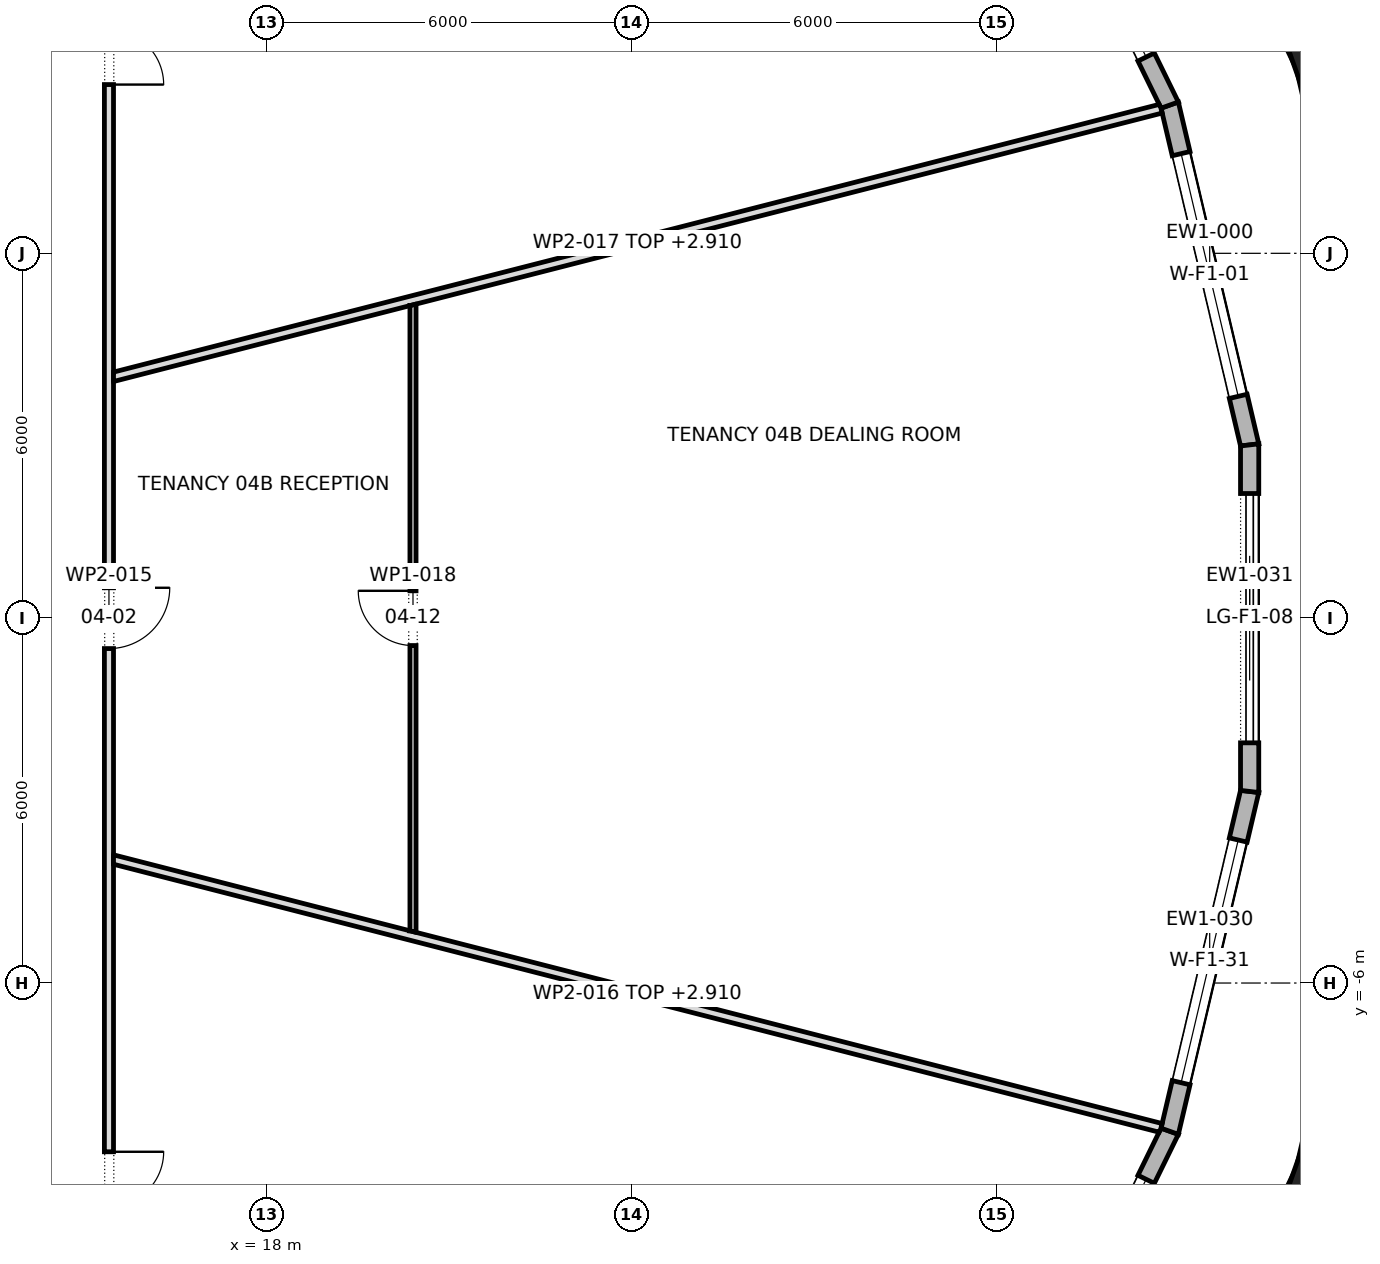
"""IFC4 building model, lengths in metres.
Left out: names, types, materials, properties, quantities, classifications, styles, units other than length and angle.
Written with IfcOpenShell. Run it as: python <this file> out.ifc"""

import sys

from ifc_helpers import new_model, si_unit, direction, frame, frame_2d, origin, origin_2d, place, context, subcontext, project, spatial, polyline, rectangle, outline, extrude, element, fill, save


model = new_model("IFC4")
c1 = context("Model", 3, precision=1e-05, world=origin(), true_north=direction((0.0, 1.0)))
c2 = subcontext(c1, "Body", "Model", "MODEL_VIEW")
j1 = project(units=[si_unit("LENGTHUNIT", "METRE"), si_unit("PLANEANGLEUNIT", "RADIAN")], contexts=[c1])
p1 = place(None, origin())
s1 = spatial("IfcSite", under=j1, at=p1, CompositionType="ELEMENT")
p2 = place(p1, origin())
s2 = spatial("IfcBuilding", under=s1, at=p2, CompositionType="ELEMENT")
p3 = place(p2, frame((0.0, 0.0, 61.3)))
s3 = spatial("IfcBuildingStorey", under=s2, at=p3, CompositionType="ELEMENT", Elevation=61.3)
for number, where, z_axis, x_axis in (
    (1, (35.382, 9.2, 0.0), (0.0, 0.0, 1.0), (-0.334, 0.943, 0.0)),
    (2, (35.382, -9.2, 0.0), (0.0, 0.0, 1.0), (0.334, 0.943, 0.0)),
):
    element("IfcColumn", number, at=place(p3, frame(where, z_axis=z_axis, x_axis=x_axis)), inside=s3, PredefinedType="COLUMN", context=c2, shape_type="SweptSolid", body=[
        extrude(rectangle(XDim=1.8, YDim=1.0, at=origin_2d()), origin(), (0.0, 0.0, 1.0), 4.2),
    ])
p4 = place(p3, frame((34.159, 2.849, 0.0), z_axis=(0.0, 0.0, 1.0), x_axis=(-0.22905355604, 0.973413821797, 0.0)))
e3 = element("IfcWall", 3, at=p4, inside=s3, PredefinedType="STANDARD", context=c2, shape_type="SweptSolid", body=[
    extrude(outline(polyline([(-0.017, -0.15), (5.758, -0.15), (5.724, 0.15), (0.017, 0.15), (-0.017, -0.15)])), origin(), (0.0, 0.0, 1.0), 3.9),
])
p5 = place(p4, frame((0.82, 0.0, 0.6)))
e4 = element("IfcOpeningElement", 4, at=p5, cuts=e3, PredefinedType="OPENING", context=c2, shape_type="SweptSolid", body=[
    extrude(rectangle(XDim=4.1, YDim=2.85, at=frame_2d((2.05, 1.425))), frame((0.0, 0.162, 0.0), z_axis=(0.0, -1.0, 0.0), x_axis=(1.0, 0.0, 0.0)), (0.0, 0.0, 1.0), 0.324),
])
p6 = place(p3, frame((32.844, 8.438, 0.0), z_axis=(0.0, 0.0, 1.0), x_axis=(-0.439949735177, 0.898022399786, 0.0)))
e5 = element("IfcWall", 5, at=p6, inside=s3, PredefinedType="STANDARD", context=c2, shape_type="SweptSolid", body=[
    extrude(outline(polyline([(-0.017, -0.15), (5.876, -0.15), (5.844, 0.15), (0.017, 0.15), (-0.017, -0.15)])), origin(), (0.0, 0.0, 1.0), 3.9),
])
p7 = place(p6, frame((0.88, 0.0, 0.6)))
e6 = element("IfcOpeningElement", 6, at=p7, cuts=e5, PredefinedType="OPENING", context=c2, shape_type="SweptSolid", body=[
    extrude(rectangle(XDim=4.1, YDim=2.85, at=frame_2d((2.05, 1.425))), frame((0.0, 0.162, 0.0), z_axis=(0.0, -1.0, 0.0), x_axis=(1.0, 0.0, 0.0)), (0.0, 0.0, 1.0), 0.324),
])
p8 = place(p3, frame((30.266, -13.7, 0.0), z_axis=(0.0, 0.0, 1.0), x_axis=(0.439949735177, 0.898022399786, 0.0)))
e7 = element("IfcWall", 7, at=p8, inside=s3, PredefinedType="STANDARD", context=c2, shape_type="SweptSolid", body=[
    extrude(outline(polyline([(-0.016, -0.15), (5.877, -0.15), (5.843, 0.15), (0.016, 0.15), (-0.016, -0.15)])), origin(), (0.0, 0.0, 1.0), 3.9),
])
p9 = place(p8, frame((0.88, 0.0, 0.6)))
e8 = element("IfcOpeningElement", 8, at=p9, cuts=e7, PredefinedType="OPENING", context=c2, shape_type="SweptSolid", body=[
    extrude(rectangle(XDim=4.1, YDim=2.85, at=frame_2d((2.05, 1.425))), frame((0.0, 0.162, 0.0), z_axis=(0.0, -1.0, 0.0), x_axis=(1.0, 0.0, 0.0)), (0.0, 0.0, 1.0), 0.324),
])
p10 = place(p3, frame((32.844, -8.438, 0.0), z_axis=(0.0, 0.0, 1.0), x_axis=(0.22905355604, 0.973413821797, 0.0)))
e9 = element("IfcWall", 9, at=p10, inside=s3, PredefinedType="STANDARD", context=c2, shape_type="SweptSolid", body=[
    extrude(outline(polyline([(-0.017, -0.15), (5.758, -0.15), (5.723, 0.15), (0.017, 0.15), (-0.017, -0.15)])), origin(), (0.0, 0.0, 1.0), 3.9),
])
p11 = place(p10, frame((0.82, 0.0, 0.6)))
e10 = element("IfcOpeningElement", 10, at=p11, cuts=e9, PredefinedType="OPENING", context=c2, shape_type="SweptSolid", body=[
    extrude(rectangle(XDim=4.1, YDim=2.85, at=frame_2d((2.05, 1.425))), frame((0.0, 0.162, 0.0), z_axis=(0.0, -1.0, 0.0), x_axis=(1.0, 0.0, 0.0)), (0.0, 0.0, 1.0), 0.324),
])
p12 = place(p3, frame((34.159, -2.849, 0.0), z_axis=(0.0, 0.0, 1.0), x_axis=(0.0, 1.0, 0.0)))
e11 = element("IfcWall", 11, at=p12, inside=s3, PredefinedType="STANDARD", context=c2, shape_type="SweptSolid", body=[
    extrude(outline(polyline([(-0.017, -0.15), (5.716, -0.15), (5.681, 0.15), (0.017, 0.15), (-0.017, -0.15)])), origin(), (0.0, 0.0, 1.0), 3.9),
])
p13 = place(p12, frame((0.799, 0.0, 0.0)))
e12 = element("IfcOpeningElement", 12, at=p13, cuts=e11, PredefinedType="OPENING", context=c2, shape_type="SweptSolid", body=[
    extrude(rectangle(XDim=4.1, YDim=3.45, at=frame_2d((2.05, 1.725))), frame((0.0, 0.162, 0.0), z_axis=(0.0, -1.0, 0.0), x_axis=(1.0, 0.0, 0.0)), (0.0, 0.0, 1.0), 0.324),
])
p14 = place(p3, frame((15.4, -15.475, 0.0), z_axis=(0.0, 0.0, 1.0), x_axis=(0.0, 1.0, 0.0)))
e13 = element("IfcWall", 13, at=p14, inside=s3, PredefinedType="PARTITIONING", context=c2, shape_type="SweptSolid", body=[
    extrude(outline(polyline([(0.0, -0.075), (1.935, -0.075), (3.869, -0.075), (5.803, -0.075), (7.738, -0.075), (9.672, -0.075), (11.606, -0.075), (13.541, -0.075), (15.475, -0.075), (17.409, -0.075), (19.344, -0.075), (21.278, -0.075), (23.212, -0.075), (25.147, -0.075), (27.081, -0.075), (29.016, -0.075), (30.95, -0.075), (30.8, 0.075), (28.885, 0.075), (26.969, 0.075), (25.053, 0.075), (23.138, 0.075), (21.222, 0.075), (19.306, 0.075), (17.391, 0.075), (15.475, 0.075), (13.56, 0.075), (11.644, 0.075), (9.728, 0.075), (7.812, 0.075), (5.897, 0.075), (3.981, 0.075), (2.066, 0.075), (0.15, 0.075), (0.0, -0.075)])), origin(), (0.0, 0.0, 1.0), 3.9),
])
p15 = place(p14, frame((4.9, 0.0, 0.0)))
e14 = element("IfcOpeningElement", 14, at=p15, cuts=e13, PredefinedType="OPENING", context=c2, shape_type="SweptSolid", body=[
    extrude(rectangle(XDim=1.8, YDim=2.1, at=frame_2d((0.9, 1.05))), frame((0.0, 0.087, 0.0), z_axis=(0.0, -1.0, 0.0), x_axis=(1.0, 0.0, 0.0)), (0.0, 0.0, 1.0), 0.174),
])
p16 = place(p14, frame((14.975, 0.0, 0.0)))
e15 = element("IfcOpeningElement", 15, at=p16, cuts=e13, PredefinedType="OPENING", context=c2, shape_type="SweptSolid", body=[
    extrude(rectangle(XDim=1.0, YDim=2.1, at=frame_2d((0.5, 1.05))), frame((0.0, 0.087, 0.0), z_axis=(0.0, -1.0, 0.0), x_axis=(1.0, 0.0, 0.0)), (0.0, 0.0, 1.0), 0.174),
])
p17 = place(p14, frame((24.25, 0.0, 0.0)))
e16 = element("IfcOpeningElement", 16, at=p17, cuts=e13, PredefinedType="OPENING", context=c2, shape_type="SweptSolid", body=[
    extrude(rectangle(XDim=1.8, YDim=2.1, at=frame_2d((0.9, 1.05))), frame((0.0, 0.087, 0.0), z_axis=(0.0, -1.0, 0.0), x_axis=(1.0, 0.0, 0.0)), (0.0, 0.0, 1.0), 0.174),
])
p18 = place(p3, frame((15.457, -3.965, 0.0), z_axis=(0.0, 0.0, 1.0), x_axis=(0.968702688789, -0.248223892349, 0.0)))
e17 = element("IfcWall", 17, at=p18, inside=s3, PredefinedType="PARTITIONING", context=c2, shape_type="SweptSolid", body=[
    extrude(outline(polyline([(0.038, -0.075), (2.01, -0.075), (3.982, -0.075), (5.955, -0.075), (7.927, -0.075), (9.899, -0.075), (11.872, -0.075), (13.844, -0.075), (15.816, -0.075), (17.788, -0.075), (17.801, -0.013), (17.801, 0.075), (15.978, 0.075), (14.155, 0.075), (12.331, 0.075), (10.508, 0.075), (8.685, 0.075), (6.861, 0.075), (5.038, 0.075), (5.032, 0.073), (5.032, 0.075), (3.355, 0.075), (1.677, 0.075), (0.0, 0.075), (0.0, 0.073), (0.038, -0.075)])), origin(), (0.0, 0.0, 1.0), 2.91),
])
p19 = place(p3, frame((15.457, 3.965, 0.0), z_axis=(0.0, 0.0, 1.0), x_axis=(0.968758808885, 0.248004778598, 0.0)))
e18 = element("IfcWall", 18, at=p19, inside=s3, PredefinedType="PARTITIONING", context=c2, shape_type="SweptSolid", body=[
    extrude(outline(polyline([(0.0, -0.075), (1.677, -0.075), (3.354, -0.075), (5.032, -0.075), (5.032, -0.075), (5.032, -0.075), (6.856, -0.075), (8.68, -0.075), (10.505, -0.075), (12.329, -0.075), (14.153, -0.075), (15.977, -0.075), (17.801, -0.075), (17.801, 0.017), (17.789, 0.075), (15.817, 0.075), (13.844, 0.075), (11.872, 0.075), (9.9, 0.075), (7.927, 0.075), (5.955, 0.075), (3.983, 0.075), (2.01, 0.075), (0.038, 0.075), (0.0, -0.073), (0.0, -0.075)])), origin(), (0.0, 0.0, 1.0), 2.91),
])
p20 = place(p3, frame((20.4, 5.165, 0.0), z_axis=(0.0, 0.0, 1.0), x_axis=(0.0, -1.0, 0.0)))
e19 = element("IfcWall", 19, at=p20, inside=s3, PredefinedType="PARTITIONING", context=c2, shape_type="SweptSolid", body=[
    extrude(outline(polyline([(0.025, -0.05), (1.739, -0.05), (3.452, -0.05), (5.166, -0.05), (6.879, -0.05), (8.593, -0.05), (10.306, -0.05), (10.332, 0.05), (10.332, 0.05), (8.61, 0.05), (6.888, 0.05), (5.166, 0.05), (3.444, 0.05), (1.722, 0.05), (0.0, 0.05), (0.0, 0.049), (0.025, -0.05)])), origin(), (0.0, 0.0, 1.0), 3.9),
])
p21 = place(p20, frame((4.715, 0.0, 0.0)))
e20 = element("IfcOpeningElement", 20, at=p21, cuts=e19, PredefinedType="OPENING", context=c2, shape_type="SweptSolid", body=[
    extrude(rectangle(XDim=0.9, YDim=2.1, at=frame_2d((0.45, 1.05))), frame((0.0, 0.062, 0.0), z_axis=(0.0, -1.0, 0.0), x_axis=(1.0, 0.0, 0.0)), (0.0, 0.0, 1.0), 0.124),
])
p22 = place(p5, origin())
e21 = element("IfcWindow", 21, at=p22, inside=s3, PartitioningType="TRIPLE_PANEL_VERTICAL", PredefinedType="WINDOW", context=c2, shape_type="SweptSolid", body=[
    extrude(rectangle(XDim=4.1, YDim=2.85, at=frame_2d((2.05, 1.425))), frame((0.0, 0.03, 0.0), z_axis=(0.0, -1.0, 0.0), x_axis=(1.0, 0.0, 0.0)), (0.0, 0.0, 1.0), 0.06),
])
fill(e4, e21)
p23 = place(p7, origin())
e22 = element("IfcWindow", 22, at=p23, inside=s3, PartitioningType="TRIPLE_PANEL_VERTICAL", PredefinedType="WINDOW", context=c2, shape_type="SweptSolid", body=[
    extrude(rectangle(XDim=4.1, YDim=2.85, at=frame_2d((2.05, 1.425))), frame((0.0, 0.03, 0.0), z_axis=(0.0, -1.0, 0.0), x_axis=(1.0, 0.0, 0.0)), (0.0, 0.0, 1.0), 0.06),
])
fill(e6, e22)
p24 = place(p9, origin())
e23 = element("IfcWindow", 23, at=p24, inside=s3, PartitioningType="TRIPLE_PANEL_VERTICAL", PredefinedType="WINDOW", context=c2, shape_type="SweptSolid", body=[
    extrude(rectangle(XDim=4.1, YDim=2.85, at=frame_2d((2.05, 1.425))), frame((0.0, 0.03, 0.0), z_axis=(0.0, -1.0, 0.0), x_axis=(1.0, 0.0, 0.0)), (0.0, 0.0, 1.0), 0.06),
])
fill(e8, e23)
p25 = place(p11, origin())
e24 = element("IfcWindow", 24, at=p25, inside=s3, PartitioningType="TRIPLE_PANEL_VERTICAL", PredefinedType="WINDOW", context=c2, shape_type="SweptSolid", body=[
    extrude(rectangle(XDim=4.1, YDim=2.85, at=frame_2d((2.05, 1.425))), frame((0.0, 0.03, 0.0), z_axis=(0.0, -1.0, 0.0), x_axis=(1.0, 0.0, 0.0)), (0.0, 0.0, 1.0), 0.06),
])
fill(e10, e24)
p26 = place(p13, origin())
e25 = element("IfcDoor", 25, at=p26, inside=s3, OperationType="DOUBLE_DOOR_SLIDING", PredefinedType="DOOR", context=c2, shape_type="SweptSolid", body=[
    extrude(rectangle(XDim=4.1, YDim=3.45, at=frame_2d((2.05, 1.725))), frame((0.0, 0.025, 0.0), z_axis=(0.0, -1.0, 0.0), x_axis=(1.0, 0.0, 0.0)), (0.0, 0.0, 1.0), 0.05),
])
fill(e12, e25)
p27 = place(p15, frame((1.8, 0.0, 0.0), z_axis=(0.0, 0.0, 1.0), x_axis=(-1.0, 0.0, 0.0)))
e26 = element("IfcDoor", 26, at=p27, inside=s3, OperationType="DOUBLE_DOOR_SINGLE_SWING", PredefinedType="DOOR", context=c2, shape_type="SweptSolid", body=[
    extrude(rectangle(XDim=1.8, YDim=2.1, at=frame_2d((0.9, 1.05))), frame((0.0, 0.025, 0.0), z_axis=(0.0, -1.0, 0.0), x_axis=(1.0, 0.0, 0.0)), (0.0, 0.0, 1.0), 0.05),
])
fill(e14, e26)
p28 = place(p16, frame((1.0, 0.0, 0.0), z_axis=(0.0, 0.0, 1.0), x_axis=(-1.0, 0.0, 0.0)))
e27 = element("IfcDoor", 27, at=p28, inside=s3, OperationType="SINGLE_SWING_RIGHT", PredefinedType="DOOR", context=c2, shape_type="SweptSolid", body=[
    extrude(rectangle(XDim=1.0, YDim=2.1, at=frame_2d((0.5, 1.05))), frame((0.0, 0.025, 0.0), z_axis=(0.0, -1.0, 0.0), x_axis=(1.0, 0.0, 0.0)), (0.0, 0.0, 1.0), 0.05),
])
fill(e15, e27)
p29 = place(p17, frame((1.8, 0.0, 0.0), z_axis=(0.0, 0.0, 1.0), x_axis=(-1.0, 0.0, 0.0)))
e28 = element("IfcDoor", 28, at=p29, inside=s3, OperationType="DOUBLE_DOOR_SINGLE_SWING", PredefinedType="DOOR", context=c2, shape_type="SweptSolid", body=[
    extrude(rectangle(XDim=1.8, YDim=2.1, at=frame_2d((0.9, 1.05))), frame((0.0, 0.025, 0.0), z_axis=(0.0, -1.0, 0.0), x_axis=(1.0, 0.0, 0.0)), (0.0, 0.0, 1.0), 0.05),
])
fill(e16, e28)
p30 = place(p21, frame((0.9, 0.0, 0.0), z_axis=(0.0, 0.0, 1.0), x_axis=(-1.0, 0.0, 0.0)))
e29 = element("IfcDoor", 29, at=p30, inside=s3, OperationType="SINGLE_SWING_LEFT", PredefinedType="DOOR", context=c2, shape_type="SweptSolid", body=[
    extrude(rectangle(XDim=0.9, YDim=2.1, at=frame_2d((0.45, 1.05))), frame((0.0, 0.025, 0.0), z_axis=(0.0, -1.0, 0.0), x_axis=(1.0, 0.0, 0.0)), (0.0, 0.0, 1.0), 0.05),
])
fill(e20, e29)
save(model, sys.argv[1])
